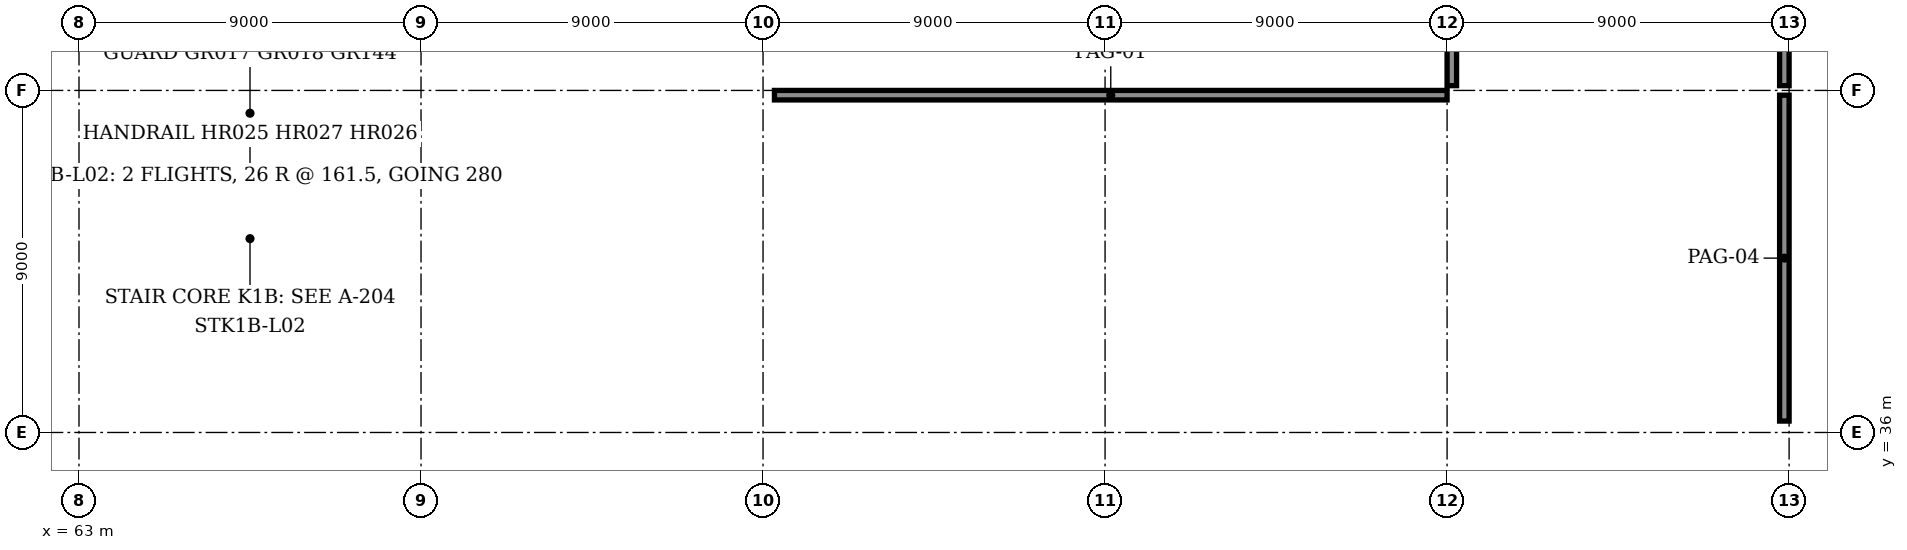
"""IFC4 building model, lengths in metres.
Left out: names, types, materials, properties, quantities, classifications, styles, units other than length and angle.
Written with IfcOpenShell. Run it as: python <this file> out.ifc"""

import sys

from ifc_helpers import new_model, si_unit, direction, frame, frame_2d, origin, origin_2d, place, context, subcontext, project, spatial, rectangle, hollow_rectangle, i_section, extrude, element, fill, save


model = new_model("IFC4")
c1 = context("Model", 3, precision=1e-05, world=origin(), true_north=direction((0.0, 1.0)))
c2 = subcontext(c1, "Body", "Model", "MODEL_VIEW")
j1 = project(units=[si_unit("LENGTHUNIT", "METRE"), si_unit("PLANEANGLEUNIT", "RADIAN")], contexts=[c1])
p1 = place(None, origin())
s1 = spatial("IfcSite", under=j1, at=p1, CompositionType="ELEMENT")
p2 = place(p1, origin())
s2 = spatial("IfcBuilding", under=s1, at=p2, CompositionType="ELEMENT")
p3 = place(p2, frame((0.0, 0.0, 9.2)))
s3 = spatial("IfcBuildingStorey", under=s2, at=p3, CompositionType="ELEMENT", Elevation=9.2)
p4 = place(p3, frame((63.0, 36.0, 0.0), z_axis=(0.0, 0.0, 1.0), x_axis=(1.0, 0.0, 0.0)))
e1 = element("IfcColumn", 1, at=p4, inside=s3, PredefinedType="COLUMN", context=c2, shape_type="SweptSolid", body=[
    extrude(i_section(OverallWidth=0.305, OverallDepth=0.308, WebThickness=0.01, FlangeThickness=0.015, FilletRadius=0.017, at=origin_2d()), origin(), (0.0, 0.0, 1.0), 4.2),
])
p5 = place(p3, frame((81.0, 36.0, 0.0), z_axis=(0.0, 0.0, 1.0), x_axis=(1.0, 0.0, 0.0)))
e2 = element("IfcColumn", 2, at=p5, inside=s3, PredefinedType="COLUMN", context=c2, shape_type="SweptSolid", body=[
    extrude(i_section(OverallWidth=0.309, OverallDepth=0.321, WebThickness=0.014, FlangeThickness=0.022, FilletRadius=0.017, at=origin_2d()), origin(), (0.0, 0.0, 1.0), 4.2),
])
p6 = place(p3, frame((90.0, 36.0, 0.0), z_axis=(0.0, 0.0, 1.0), x_axis=(1.0, 0.0, 0.0)))
e3 = element("IfcColumn", 3, at=p6, inside=s3, PredefinedType="COLUMN", context=c2, shape_type="SweptSolid", body=[
    extrude(i_section(OverallWidth=0.305, OverallDepth=0.308, WebThickness=0.01, FlangeThickness=0.015, FilletRadius=0.017, at=origin_2d()), origin(), (0.0, 0.0, 1.0), 4.2),
])
p7 = place(p3, frame((99.0, 36.0, 0.0), z_axis=(0.0, 0.0, 1.0), x_axis=(1.0, 0.0, 0.0)))
e4 = element("IfcColumn", 4, at=p7, inside=s3, PredefinedType="COLUMN", context=c2, shape_type="SweptSolid", body=[
    extrude(i_section(OverallWidth=0.309, OverallDepth=0.321, WebThickness=0.014, FlangeThickness=0.022, FilletRadius=0.017, at=origin_2d()), origin(), (0.0, 0.0, 1.0), 4.2),
])
p8 = place(p3, frame((90.0, 45.0, 0.0), z_axis=(0.0, 0.0, 1.0), x_axis=(1.0, 0.0, 0.0)))
e5 = element("IfcColumn", 5, at=p8, inside=s3, PredefinedType="COLUMN", context=c2, shape_type="SweptSolid", body=[
    extrude(hollow_rectangle(XDim=0.25, YDim=0.25, WallThickness=0.01, InnerFilletRadius=0.015, OuterFilletRadius=0.025, at=origin_2d()), origin(), (0.0, 0.0, 1.0), 3.7),
])
p9 = place(p3, frame((99.0, 45.0, 0.0), z_axis=(0.0, 0.0, 1.0), x_axis=(1.0, 0.0, 0.0)))
e6 = element("IfcColumn", 6, at=p9, inside=s3, PredefinedType="COLUMN", context=c2, shape_type="SweptSolid", body=[
    extrude(hollow_rectangle(XDim=0.3, YDim=0.3, WallThickness=0.01, InnerFilletRadius=0.015, OuterFilletRadius=0.025, at=origin_2d()), origin(), (0.0, 0.0, 1.0), 3.7),
])
p10 = place(p3, frame((108.0, 45.0, 0.0), z_axis=(0.0, 0.0, 1.0), x_axis=(1.0, 0.0, 0.0)))
e7 = element("IfcColumn", 7, at=p10, inside=s3, PredefinedType="COLUMN", context=c2, shape_type="SweptSolid", body=[
    extrude(hollow_rectangle(XDim=0.25, YDim=0.25, WallThickness=0.01, InnerFilletRadius=0.015, OuterFilletRadius=0.025, at=origin_2d()), origin(), (0.0, 0.0, 1.0), 3.7),
])
for number, where, z_axis, x_axis in (
    (8, (107.92, 36.0, 0.0), (0.0, 0.0, 1.0), (0.0, 1.0, 0.0)),
    (9, (107.92, 45.125, 0.0), (0.0, 0.0, 1.0), (0.0, 1.0, 0.0)),
):
    element("IfcWall", number, at=place(p3, frame(where, z_axis=z_axis, x_axis=x_axis)), inside=s3, PredefinedType="SOLIDWALL", context=c2, shape_type="SweptSolid", body=[
        extrude(rectangle(XDim=8.875, YDim=0.28, at=frame_2d((4.438, 0.0))), origin(), (0.0, 0.0, 1.0), 2.75),
    ])
p11 = place(p3, frame((90.125, 44.92, 0.0), z_axis=(0.0, 0.0, 1.0), x_axis=(1.0, 0.0, 0.0)))
e10 = element("IfcWall", 10, at=p11, inside=s3, PredefinedType="SOLIDWALL", context=c2, shape_type="SweptSolid", body=[
    extrude(rectangle(XDim=8.725, YDim=0.28, at=frame_2d((4.363, 0.0))), origin(), (0.0, 0.0, 1.0), 2.75),
])
p12 = place(p3, frame((81.0, 44.92, 0.0), z_axis=(0.0, 0.0, 1.0), x_axis=(1.0, 0.0, 0.0)))
e11 = element("IfcWall", 11, at=p12, inside=s3, PredefinedType="SOLIDWALL", context=c2, shape_type="SweptSolid", body=[
    extrude(rectangle(XDim=8.875, YDim=0.28, at=frame_2d((4.438, 0.0))), origin(), (0.0, 0.0, 1.0), 2.75),
])
p13 = place(p3, frame((54.25, 44.91, 0.0), z_axis=(0.0, 0.0, 1.0), x_axis=(1.0, 0.0, 0.0)))
e12 = element("IfcWall", 12, at=p13, inside=s3, PredefinedType="SOLIDWALL", context=c2, shape_type="SweptSolid", body=[
    extrude(rectangle(XDim=8.75, YDim=0.3, at=frame_2d((4.375, 0.0))), origin(), (0.0, 0.0, 1.0), 3.578),
])
p14 = place(p3, frame((81.3, 44.875, 3.7), z_axis=(0.0, 0.0, 1.0), x_axis=(1.0, 0.0, 0.0)))
e13 = element("IfcWall", 13, at=p14, inside=s3, PredefinedType="PARAPET", context=c2, shape_type="SweptSolid", body=[
    extrude(rectangle(XDim=17.7, YDim=0.25, at=frame_2d((8.85, 0.0))), origin(), (0.0, 0.0, 1.0), 1.6),
])
for number, where, z_axis, x_axis in (
    (14, (99.125, 45.125, 3.7), (0.0, 0.0, 1.0), (0.0, 1.0, 0.0)),
    (15, (107.875, 45.125, 3.7), (0.0, 0.0, 1.0), (0.0, 1.0, 0.0)),
    (16, (107.875, 36.3, 3.7), (0.0, 0.0, 1.0), (0.0, 1.0, 0.0)),
):
    element("IfcWall", number, at=place(p3, frame(where, z_axis=z_axis, x_axis=x_axis)), inside=s3, PredefinedType="PARAPET", context=c2, shape_type="SweptSolid", body=[
        extrude(rectangle(XDim=8.575, YDim=0.25, at=frame_2d((4.288, 0.0))), origin(), (0.0, 0.0, 1.0), 1.6),
    ])
p15 = place(p3, frame((63.0, 40.65, 0.0), z_axis=(0.0, 0.0, 1.0), x_axis=(1.0, 0.0, 0.0)))
e17 = element("IfcWall", 17, at=p15, inside=s3, PredefinedType="SOLIDWALL", context=c2, shape_type="SweptSolid", body=[
    extrude(rectangle(XDim=9.0, YDim=0.3, at=frame_2d((4.5, 0.0))), origin(), (0.0, 0.0, 1.0), 4.2),
])
p16 = place(p3, frame((71.85, 40.8, 0.0), z_axis=(0.0, 0.0, 1.0), x_axis=(0.0, 1.0, 0.0)))
e18 = element("IfcWall", 18, at=p16, inside=s3, PredefinedType="SOLIDWALL", context=c2, shape_type="SweptSolid", body=[
    extrude(rectangle(XDim=3.9, YDim=0.3, at=frame_2d((1.95, 0.0))), origin(), (0.0, 0.0, 1.0), 4.2),
])
p17 = place(p3, frame((63.0, 44.85, 0.0), z_axis=(0.0, 0.0, 1.0), x_axis=(1.0, 0.0, 0.0)))
e19 = element("IfcWall", 19, at=p17, inside=s3, PredefinedType="SOLIDWALL", context=c2, shape_type="SweptSolid", body=[
    extrude(rectangle(XDim=9.0, YDim=0.3, at=frame_2d((4.5, 0.0))), origin(), (0.0, 0.0, 1.0), 4.2),
])
p18 = place(p3, frame((63.15, 40.8, 0.0), z_axis=(0.0, 0.0, 1.0), x_axis=(0.0, 1.0, 0.0)))
e20 = element("IfcWall", 20, at=p18, inside=s3, PredefinedType="SOLIDWALL", context=c2, shape_type="SweptSolid", body=[
    extrude(rectangle(XDim=3.9, YDim=0.3, at=frame_2d((1.95, 0.0))), origin(), (0.0, 0.0, 1.0), 4.2),
])
p19 = place(p18, frame((1.05, 0.0, 0.0)))
e21 = element("IfcOpeningElement", 21, at=p19, cuts=e20, PredefinedType="OPENING", context=c2, shape_type="SweptSolid", body=[
    extrude(rectangle(XDim=1.8, YDim=2.1, at=frame_2d((0.9, 1.05))), frame((0.0, 0.16, 0.0), z_axis=(0.0, -1.0, 0.0), x_axis=(1.0, 0.0, 0.0)), (0.0, 0.0, 1.0), 0.32),
])
p20 = place(p3, frame((107.85, 27.3, 0.0), z_axis=(0.0, 0.0, 1.0), x_axis=(0.0, 1.0, 0.0)))
e22 = element("IfcWall", 22, at=p20, inside=s3, PredefinedType="SOLIDWALL", context=c2, shape_type="SweptSolid", body=[
    extrude(rectangle(XDim=8.4, YDim=0.3, at=frame_2d((4.2, 0.0))), origin(), (0.0, 0.0, 1.0), 4.2),
])
p21 = place(p3, frame((103.5, 35.85, 0.0), z_axis=(0.0, 0.0, 1.0), x_axis=(1.0, 0.0, 0.0)))
e23 = element("IfcWall", 23, at=p21, inside=s3, PredefinedType="SOLIDWALL", context=c2, shape_type="SweptSolid", body=[
    extrude(rectangle(XDim=4.5, YDim=0.3, at=frame_2d((2.25, 0.0))), origin(), (0.0, 0.0, 1.0), 4.2),
])
p22 = place(p21, frame((1.35, 0.0, 0.0)))
e24 = element("IfcOpeningElement", 24, at=p22, cuts=e23, PredefinedType="OPENING", context=c2, shape_type="SweptSolid", body=[
    extrude(rectangle(XDim=1.8, YDim=2.1, at=frame_2d((0.9, 1.05))), frame((0.0, 0.16, 0.0), z_axis=(0.0, -1.0, 0.0), x_axis=(1.0, 0.0, 0.0)), (0.0, 0.0, 1.0), 0.32),
])
p23 = place(p3, frame((103.65, 27.3, 0.0), z_axis=(0.0, 0.0, 1.0), x_axis=(0.0, 1.0, 0.0)))
e25 = element("IfcWall", 25, at=p23, inside=s3, PredefinedType="SOLIDWALL", context=c2, shape_type="SweptSolid", body=[
    extrude(rectangle(XDim=8.4, YDim=0.3, at=frame_2d((4.2, 0.0))), origin(), (0.0, 0.0, 1.0), 4.2),
])
p24 = place(p3, frame((72.0, 45.15, 0.0), z_axis=(0.0, 0.0, 1.0), x_axis=(1.0, 0.0, 0.0)))
e26 = element("IfcWall", 26, at=p24, inside=s3, PredefinedType="SOLIDWALL", context=c2, shape_type="SweptSolid", body=[
    extrude(rectangle(XDim=9.0, YDim=0.3, at=frame_2d((4.5, 0.0))), origin(), (0.0, 0.0, 1.0), 4.2),
])
p25 = place(p24, frame((3.3, 0.0, 0.0)))
e27 = element("IfcOpeningElement", 27, at=p25, cuts=e26, PredefinedType="OPENING", context=c2, shape_type="SweptSolid", body=[
    extrude(rectangle(XDim=2.4, YDim=2.4, at=frame_2d((1.2, 1.2))), frame((0.0, 0.16, 0.0), z_axis=(0.0, -1.0, 0.0), x_axis=(1.0, 0.0, 0.0)), (0.0, 0.0, 1.0), 0.32),
])
for number, where, z_axis, x_axis in (
    (28, (80.85, 45.3, 0.0), (0.0, 0.0, 1.0), (0.0, 1.0, 0.0)),
    (29, (72.15, 45.3, 0.0), (0.0, 0.0, 1.0), (0.0, 1.0, 0.0)),
):
    element("IfcWall", number, at=place(p3, frame(where, z_axis=z_axis, x_axis=x_axis)), inside=s3, PredefinedType="SOLIDWALL", context=c2, shape_type="SweptSolid", body=[
        extrude(rectangle(XDim=8.4, YDim=0.3, at=frame_2d((4.2, 0.0))), origin(), (0.0, 0.0, 1.0), 4.2),
    ])
p26 = place(p3, frame((76.35, 27.3, 0.0), z_axis=(0.0, 0.0, 1.0), x_axis=(0.0, 1.0, 0.0)))
e30 = element("IfcWall", 30, at=p26, inside=s3, PredefinedType="SOLIDWALL", context=c2, shape_type="SweptSolid", body=[
    extrude(rectangle(XDim=8.4, YDim=0.3, at=frame_2d((4.2, 0.0))), origin(), (0.0, 0.0, 1.0), 4.2),
])
p27 = place(p26, frame((0.45, 0.0, 0.0)))
e31 = element("IfcOpeningElement", 31, at=p27, cuts=e30, PredefinedType="OPENING", context=c2, shape_type="SweptSolid", body=[
    extrude(rectangle(XDim=1.4, YDim=2.1, at=frame_2d((0.7, 1.05))), frame((0.0, 0.16, 0.0), z_axis=(0.0, -1.0, 0.0), x_axis=(1.0, 0.0, 0.0)), (0.0, 0.0, 1.0), 0.32),
])
p28 = place(p26, frame((4.925, 0.0, 0.0)))
e32 = element("IfcOpeningElement", 32, at=p28, cuts=e30, PredefinedType="OPENING", context=c2, shape_type="SweptSolid", body=[
    extrude(rectangle(XDim=1.0, YDim=2.1, at=frame_2d((0.5, 1.05))), frame((0.0, 0.16, 0.0), z_axis=(0.0, -1.0, 0.0), x_axis=(1.0, 0.0, 0.0)), (0.0, 0.0, 1.0), 0.32),
])
p29 = place(p3, frame((72.0, 35.85, 0.0), z_axis=(0.0, 0.0, 1.0), x_axis=(1.0, 0.0, 0.0)))
e33 = element("IfcWall", 33, at=p29, inside=s3, PredefinedType="SOLIDWALL", context=c2, shape_type="SweptSolid", body=[
    extrude(rectangle(XDim=4.5, YDim=0.3, at=frame_2d((2.25, 0.0))), origin(), (0.0, 0.0, 1.0), 4.2),
])
p30 = place(p3, frame((72.15, 27.3, 0.0), z_axis=(0.0, 0.0, 1.0), x_axis=(0.0, 1.0, 0.0)))
e34 = element("IfcWall", 34, at=p30, inside=s3, PredefinedType="SOLIDWALL", context=c2, shape_type="SweptSolid", body=[
    extrude(rectangle(XDim=8.4, YDim=0.3, at=frame_2d((4.2, 0.0))), origin(), (0.0, 0.0, 1.0), 4.2),
])
p31 = place(p30, frame((0.45, 0.0, 0.0)))
e35 = element("IfcOpeningElement", 35, at=p31, cuts=e34, PredefinedType="OPENING", context=c2, shape_type="SweptSolid", body=[
    extrude(rectangle(XDim=1.4, YDim=2.1, at=frame_2d((0.7, 1.05))), frame((0.0, 0.16, 0.0), z_axis=(0.0, -1.0, 0.0), x_axis=(1.0, 0.0, 0.0)), (0.0, 0.0, 1.0), 0.32),
])
p32 = place(p3, frame((58.5, 36.0, 0.0), z_axis=(0.0, 0.0, 1.0), x_axis=(1.0, 0.0, 0.0)))
e36 = element("IfcWall", 36, at=p32, inside=s3, PredefinedType="PARTITIONING", context=c2, shape_type="SweptSolid", body=[
    extrude(rectangle(XDim=4.347, YDim=0.2, at=frame_2d((2.174, 0.0))), origin(), (0.0, 0.0, 1.0), 3.502),
])
p33 = place(p32, frame((0.985, 0.0, 0.0)))
e37 = element("IfcOpeningElement", 37, at=p33, cuts=e36, PredefinedType="OPENING", context=c2, shape_type="SweptSolid", body=[
    extrude(rectangle(XDim=2.4, YDim=2.4, at=frame_2d((1.2, 1.2))), frame((0.0, 0.11, 0.0), z_axis=(0.0, -1.0, 0.0), x_axis=(1.0, 0.0, 0.0)), (0.0, 0.0, 1.0), 0.22),
])
p34 = place(p3, frame((71.925, 36.0, 0.0), z_axis=(0.0, 0.0, 1.0), x_axis=(0.0, 1.0, 0.0)))
e38 = element("IfcWall", 38, at=p34, inside=s3, PredefinedType="PARTITIONING", context=c2, shape_type="SweptSolid", body=[
    extrude(rectangle(XDim=3.0, YDim=0.15, at=frame_2d((1.5, 0.0))), origin(), (0.0, 0.0, 1.0), 3.035),
])
p35 = place(p3, frame((71.925, 39.0, 0.0), z_axis=(0.0, 0.0, 1.0), x_axis=(0.0, 1.0, 0.0)))
e39 = element("IfcWall", 39, at=p35, inside=s3, PredefinedType="PARTITIONING", context=c2, shape_type="SweptSolid", body=[
    extrude(rectangle(XDim=1.5, YDim=0.15, at=frame_2d((0.75, 0.0))), origin(), (0.0, 0.0, 1.0), 3.035),
])
p36 = place(p3, frame((76.5, 35.925, 0.0), z_axis=(0.0, 0.0, 1.0), x_axis=(1.0, 0.0, 0.0)))
e40 = element("IfcWall", 40, at=p36, inside=s3, PredefinedType="PARTITIONING", context=c2, shape_type="SweptSolid", body=[
    extrude(rectangle(XDim=4.345, YDim=0.15, at=frame_2d((2.173, 0.0))), origin(), (0.0, 0.0, 1.0), 3.035),
])
p37 = place(p36, frame((1.641, 0.0, 0.0)))
e41 = element("IfcOpeningElement", 41, at=p37, cuts=e40, PredefinedType="OPENING", context=c2, shape_type="SweptSolid", body=[
    extrude(rectangle(XDim=1.0, YDim=2.1, at=frame_2d((0.5, 1.05))), frame((0.0, 0.085, 0.0), z_axis=(0.0, -1.0, 0.0), x_axis=(1.0, 0.0, 0.0)), (0.0, 0.0, 1.0), 0.17),
])
for number, where, z_axis, x_axis in (
    (42, (81.155, 35.925, 0.0), (0.0, 0.0, 1.0), (1.0, 0.0, 0.0)),
    (43, (90.153, 35.925, 0.0), (0.0, 0.0, 1.0), (1.0, 0.0, 0.0)),
):
    element("IfcWall", number, at=place(p3, frame(where, z_axis=z_axis, x_axis=x_axis)), inside=s3, PredefinedType="PARTITIONING", context=c2, shape_type="SweptSolid", body=[
        extrude(rectangle(XDim=8.693, YDim=0.15, at=frame_2d((4.346, 0.0))), origin(), (0.0, 0.0, 1.0), 3.035),
    ])
p38 = place(p3, frame((99.155, 35.925, 0.0), z_axis=(0.0, 0.0, 1.0), x_axis=(1.0, 0.0, 0.0)))
e44 = element("IfcWall", 44, at=p38, inside=s3, PredefinedType="PARTITIONING", context=c2, shape_type="SweptSolid", body=[
    extrude(rectangle(XDim=4.345, YDim=0.15, at=frame_2d((2.173, 0.0))), origin(), (0.0, 0.0, 1.0), 3.035),
])
p39 = place(p3, frame((72.0, 39.0, 0.0), z_axis=(0.0, 0.0, 1.0), x_axis=(1.0, 0.0, 0.0)))
e45 = element("IfcWall", 45, at=p39, inside=s3, PredefinedType="PARTITIONING", context=c2, shape_type="SweptSolid", body=[
    extrude(rectangle(XDim=9.0, YDim=0.1, at=frame_2d((4.5, 0.0))), origin(), (0.0, 0.0, 1.0), 2.658),
])
p40 = place(p39, frame((3.95, 0.0, 0.0)))
e46 = element("IfcOpeningElement", 46, at=p40, cuts=e45, PredefinedType="OPENING", context=c2, shape_type="SweptSolid", body=[
    extrude(rectangle(XDim=1.0, YDim=2.1, at=frame_2d((0.5, 1.05))), frame((0.0, 0.06, 0.0), z_axis=(0.0, -1.0, 0.0), x_axis=(1.0, 0.0, 0.0)), (0.0, 0.0, 1.0), 0.12),
])
p41 = place(p3, frame((81.0, 39.0, 0.0), z_axis=(0.0, 0.0, 1.0), x_axis=(1.0, 0.0, 0.0)))
e47 = element("IfcWall", 47, at=p41, inside=s3, PredefinedType="PARTITIONING", context=c2, shape_type="SweptSolid", body=[
    extrude(rectangle(XDim=9.0, YDim=0.15, at=frame_2d((4.5, 0.0))), origin(), (0.0, 0.0, 1.0), 2.658),
])
p42 = place(p41, frame((3.985, 0.0, 0.0)))
e48 = element("IfcOpeningElement", 48, at=p42, cuts=e47, PredefinedType="OPENING", context=c2, shape_type="SweptSolid", body=[
    extrude(rectangle(XDim=1.0, YDim=2.1, at=frame_2d((0.5, 1.05))), frame((0.0, 0.085, 0.0), z_axis=(0.0, -1.0, 0.0), x_axis=(1.0, 0.0, 0.0)), (0.0, 0.0, 1.0), 0.17),
])
p43 = place(p3, frame((90.0, 39.0, 0.0), z_axis=(0.0, 0.0, 1.0), x_axis=(1.0, 0.0, 0.0)))
e49 = element("IfcWall", 49, at=p43, inside=s3, PredefinedType="PARTITIONING", context=c2, shape_type="SweptSolid", body=[
    extrude(rectangle(XDim=9.0, YDim=0.15, at=frame_2d((4.5, 0.0))), origin(), (0.0, 0.0, 1.0), 2.658),
])
p44 = place(p43, frame((3.985, 0.0, 0.0)))
e50 = element("IfcOpeningElement", 50, at=p44, cuts=e49, PredefinedType="OPENING", context=c2, shape_type="SweptSolid", body=[
    extrude(rectangle(XDim=1.0, YDim=2.1, at=frame_2d((0.5, 1.05))), frame((0.0, 0.085, 0.0), z_axis=(0.0, -1.0, 0.0), x_axis=(1.0, 0.0, 0.0)), (0.0, 0.0, 1.0), 0.17),
])
p45 = place(p3, frame((99.0, 39.0, 0.0), z_axis=(0.0, 0.0, 1.0), x_axis=(1.0, 0.0, 0.0)))
e51 = element("IfcWall", 51, at=p45, inside=s3, PredefinedType="PARTITIONING", context=c2, shape_type="SweptSolid", body=[
    extrude(rectangle(XDim=9.0, YDim=0.15, at=frame_2d((4.5, 0.0))), origin(), (0.0, 0.0, 1.0), 2.658),
])
p46 = place(p45, frame((3.985, 0.0, 0.0)))
e52 = element("IfcOpeningElement", 52, at=p46, cuts=e51, PredefinedType="OPENING", context=c2, shape_type="SweptSolid", body=[
    extrude(rectangle(XDim=1.0, YDim=2.1, at=frame_2d((0.5, 1.05))), frame((0.0, 0.085, 0.0), z_axis=(0.0, -1.0, 0.0), x_axis=(1.0, 0.0, 0.0)), (0.0, 0.0, 1.0), 0.17),
])
p47 = place(p3, frame((81.0, 39.0, 0.0), z_axis=(0.0, 0.0, 1.0), x_axis=(0.0, 1.0, 0.0)))
e53 = element("IfcWall", 53, at=p47, inside=s3, PredefinedType="PARTITIONING", context=c2, shape_type="SweptSolid", body=[
    extrude(rectangle(XDim=6.0, YDim=0.15, at=frame_2d((3.0, 0.0))), origin(), (0.0, 0.0, 1.0), 2.658),
])
p48 = place(p3, frame((90.0, 39.0, 0.0), z_axis=(0.0, 0.0, 1.0), x_axis=(0.0, 1.0, 0.0)))
e54 = element("IfcWall", 54, at=p48, inside=s3, PredefinedType="PARTITIONING", context=c2, shape_type="SweptSolid", body=[
    extrude(rectangle(XDim=5.875, YDim=0.125, at=frame_2d((2.938, 0.0))), origin(), (0.0, 0.0, 1.0), 2.658),
])
p49 = place(p3, frame((99.0, 39.0, 0.0), z_axis=(0.0, 0.0, 1.0), x_axis=(0.0, 1.0, 0.0)))
e55 = element("IfcWall", 55, at=p49, inside=s3, PredefinedType="PARTITIONING", context=c2, shape_type="SweptSolid", body=[
    extrude(rectangle(XDim=5.85, YDim=0.125, at=frame_2d((2.925, 0.0))), origin(), (0.0, 0.0, 1.0), 2.658),
])
p50 = place(p19, frame((1.8, 0.0, 0.0), z_axis=(0.0, 0.0, 1.0), x_axis=(-1.0, 0.0, 0.0)))
e56 = element("IfcDoor", 56, at=p50, inside=s3, OperationType="DOUBLE_DOOR_SINGLE_SWING", PredefinedType="DOOR", context=c2, shape_type="SweptSolid", body=[
    extrude(rectangle(XDim=1.8, YDim=2.1, at=frame_2d((0.9, 1.05))), frame((0.0, 0.025, 0.0), z_axis=(0.0, -1.0, 0.0), x_axis=(1.0, 0.0, 0.0)), (0.0, 0.0, 1.0), 0.05),
])
fill(e21, e56)
p51 = place(p22, frame((1.8, 0.0, 0.0), z_axis=(0.0, 0.0, 1.0), x_axis=(-1.0, 0.0, 0.0)))
e57 = element("IfcDoor", 57, at=p51, inside=s3, OperationType="DOUBLE_DOOR_SINGLE_SWING", PredefinedType="DOOR", context=c2, shape_type="SweptSolid", body=[
    extrude(rectangle(XDim=1.8, YDim=2.1, at=frame_2d((0.9, 1.05))), frame((0.0, 0.025, 0.0), z_axis=(0.0, -1.0, 0.0), x_axis=(1.0, 0.0, 0.0)), (0.0, 0.0, 1.0), 0.05),
])
fill(e24, e57)
p52 = place(p25, frame((2.4, 0.0, 0.0), z_axis=(0.0, 0.0, 1.0), x_axis=(-1.0, 0.0, 0.0)))
e58 = element("IfcDoor", 58, at=p52, inside=s3, OperationType="DOUBLE_DOOR_SINGLE_SWING", PredefinedType="DOOR", context=c2, shape_type="SweptSolid", body=[
    extrude(rectangle(XDim=2.4, YDim=2.4, at=frame_2d((1.2, 1.2))), frame((0.0, 0.025, 0.0), z_axis=(0.0, -1.0, 0.0), x_axis=(1.0, 0.0, 0.0)), (0.0, 0.0, 1.0), 0.05),
])
fill(e27, e58)
p53 = place(p37, origin())
e59 = element("IfcDoor", 59, at=p53, inside=s3, OperationType="SINGLE_SWING_RIGHT", PredefinedType="DOOR", context=c2, shape_type="SweptSolid", body=[
    extrude(rectangle(XDim=1.0, YDim=2.1, at=frame_2d((0.5, 1.05))), frame((0.0, 0.025, 0.0), z_axis=(0.0, -1.0, 0.0), x_axis=(1.0, 0.0, 0.0)), (0.0, 0.0, 1.0), 0.05),
])
fill(e41, e59)
p54 = place(p40, frame((1.0, 0.0, 0.0), z_axis=(0.0, 0.0, 1.0), x_axis=(-1.0, 0.0, 0.0)))
e60 = element("IfcDoor", 60, at=p54, inside=s3, OperationType="SINGLE_SWING_RIGHT", PredefinedType="DOOR", context=c2, shape_type="SweptSolid", body=[
    extrude(rectangle(XDim=1.0, YDim=2.1, at=frame_2d((0.5, 1.05))), frame((0.0, 0.025, 0.0), z_axis=(0.0, -1.0, 0.0), x_axis=(1.0, 0.0, 0.0)), (0.0, 0.0, 1.0), 0.05),
])
fill(e46, e60)
p55 = place(p46, origin())
e61 = element("IfcDoor", 61, at=p55, inside=s3, OperationType="SINGLE_SWING_RIGHT", PredefinedType="DOOR", context=c2, shape_type="SweptSolid", body=[
    extrude(rectangle(XDim=1.0, YDim=2.1, at=frame_2d((0.5, 1.05))), frame((0.0, 0.025, 0.0), z_axis=(0.0, -1.0, 0.0), x_axis=(1.0, 0.0, 0.0)), (0.0, 0.0, 1.0), 0.05),
])
fill(e52, e61)
p56 = place(p42, origin())
e62 = element("IfcDoor", 62, at=p56, inside=s3, OperationType="SINGLE_SWING_LEFT", PredefinedType="DOOR", context=c2, shape_type="SweptSolid", body=[
    extrude(rectangle(XDim=1.0, YDim=2.1, at=frame_2d((0.5, 1.05))), frame((0.0, 0.025, 0.0), z_axis=(0.0, -1.0, 0.0), x_axis=(1.0, 0.0, 0.0)), (0.0, 0.0, 1.0), 0.05),
])
fill(e48, e62)
p57 = place(p44, origin())
e63 = element("IfcDoor", 63, at=p57, inside=s3, OperationType="SINGLE_SWING_RIGHT", PredefinedType="DOOR", context=c2, shape_type="SweptSolid", body=[
    extrude(rectangle(XDim=1.0, YDim=2.1, at=frame_2d((0.5, 1.05))), frame((0.0, 0.025, 0.0), z_axis=(0.0, -1.0, 0.0), x_axis=(1.0, 0.0, 0.0)), (0.0, 0.0, 1.0), 0.05),
])
fill(e50, e63)
save(model, sys.argv[1])
